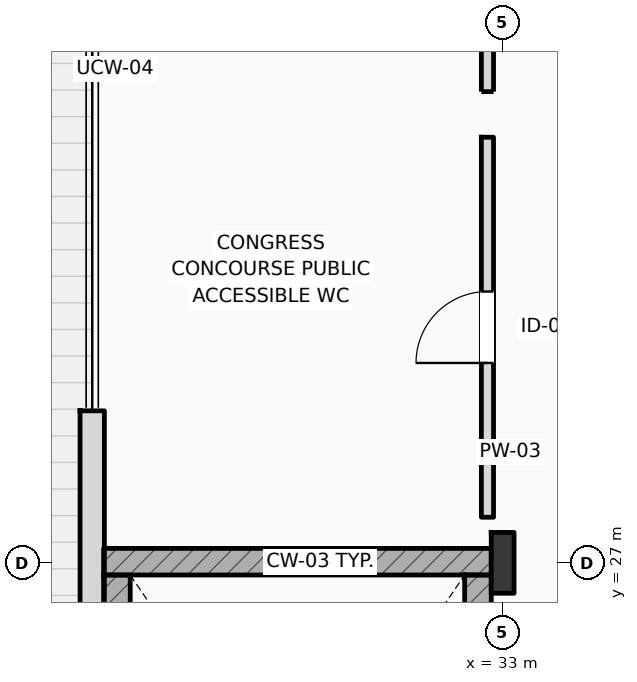
"""IFC4 building model, lengths in metres.
Left out: names, types, materials, properties, quantities, classifications, styles, units other than length and angle.
Written with IfcOpenShell. Run it as: python <this file> out.ifc"""

import sys

from ifc_helpers import new_model, si_unit, direction, frame, frame_2d, origin, origin_2d, place, context, subcontext, project, spatial, rectangle, i_section, extrude, element, fill, save


model = new_model("IFC4")
c1 = context("Model", 3, precision=1e-05, world=origin(), true_north=direction((0.0, 1.0)))
c2 = subcontext(c1, "Body", "Model", "MODEL_VIEW")
j1 = project(units=[si_unit("LENGTHUNIT", "METRE"), si_unit("PLANEANGLEUNIT", "RADIAN")], contexts=[c1])
p1 = place(None, origin())
s1 = spatial("IfcSite", under=j1, at=p1, CompositionType="ELEMENT")
p2 = place(p1, origin())
s2 = spatial("IfcBuilding", under=s1, at=p2, CompositionType="ELEMENT")
p3 = place(p2, origin())
s3 = spatial("IfcBuildingStorey", under=s2, at=p3, CompositionType="ELEMENT", Elevation=0.0)
p4 = place(p3, frame((33.0, 27.0, 0.0), z_axis=(0.0, 0.0, 1.0), x_axis=(1.0, 0.0, 0.0)))
e1 = element("IfcColumn", 1, at=p4, inside=s3, PredefinedType="COLUMN", context=c2, shape_type="SweptSolid", body=[
    extrude(i_section(OverallWidth=0.3, OverallDepth=0.8, WebThickness=0.018, FlangeThickness=0.033, FilletRadius=0.03, at=origin_2d()), origin(), (0.0, 0.0, 1.0), 6.0),
])
p5 = place(p3, frame((27.75, 27.015, 0.0), z_axis=(0.0, 0.0, 1.0), x_axis=(1.0, 0.0, 0.0)))
e2 = element("IfcWall", 2, at=p5, inside=s3, PredefinedType="SHEAR", context=c2, shape_type="SweptSolid", body=[
    extrude(rectangle(XDim=5.1, YDim=0.35, at=frame_2d((2.55, 0.0))), origin(), (0.0, 0.0, 1.0), 6.0),
])
for number, where, z_axis, x_axis in (
    (3, (27.925, 18.16, 0.0), (0.0, 0.0, 1.0), (0.0, 1.0, 0.0)),
    (4, (32.675, 18.16, 0.0), (0.0, 0.0, 1.0), (0.0, 1.0, 0.0)),
):
    element("IfcWall", number, at=place(p3, frame(where, z_axis=z_axis, x_axis=x_axis)), inside=s3, PredefinedType="SHEAR", context=c2, shape_type="SweptSolid", body=[
        extrude(rectangle(XDim=8.68, YDim=0.35, at=frame_2d((4.34, 0.0))), origin(), (0.0, 0.0, 1.0), 6.0),
    ])
p6 = place(p3, frame((27.6, 20.0, 0.0), z_axis=(0.0, 0.0, 1.0), x_axis=(0.0, 1.0, 0.0)))
e5 = element("IfcWall", 5, at=p6, inside=s3, PredefinedType="STANDARD", context=c2, shape_type="SweptSolid", body=[
    extrude(rectangle(XDim=9.0, YDim=0.32, at=frame_2d((4.5, 0.0))), origin(), (0.0, 0.0, 1.0), 5.36),
])
p7 = place(p3, frame((32.8, 27.6, 0.0), z_axis=(0.0, 0.0, 1.0), x_axis=(0.0, 1.0, 0.0)))
e6 = element("IfcWall", 6, at=p7, inside=s3, PredefinedType="PARTITIONING", context=c2, shape_type="SweptSolid", body=[
    extrude(rectangle(XDim=5.0, YDim=0.16, at=frame_2d((2.5, 0.0))), origin(), (0.0, 0.0, 1.0), 5.2),
])
p8 = place(p7, frame((2.03, 0.0, 0.0)))
e7 = element("IfcOpeningElement", 7, at=p8, cuts=e6, PredefinedType="OPENING", context=c2, shape_type="SweptSolid", body=[
    extrude(rectangle(XDim=0.94, YDim=2.15, at=frame_2d((0.47, 1.075))), frame((0.0, 0.09, 0.0), z_axis=(0.0, -1.0, 0.0), x_axis=(1.0, 0.0, 0.0)), (0.0, 0.0, 1.0), 0.18),
])
p9 = place(p3, frame((32.8, 33.2, 0.0), z_axis=(0.0, 0.0, 1.0), x_axis=(0.0, 1.0, 0.0)))
e8 = element("IfcWall", 8, at=p9, inside=s3, PredefinedType="PARTITIONING", context=c2, shape_type="SweptSolid", body=[
    extrude(rectangle(XDim=10.9, YDim=0.16, at=frame_2d((5.45, 0.0))), origin(), (0.0, 0.0, 1.0), 5.2),
])
p10 = place(p9, frame((5.0, 0.0, 0.0)))
e9 = element("IfcOpeningElement", 9, at=p10, cuts=e8, PredefinedType="OPENING", context=c2, shape_type="SweptSolid", body=[
    extrude(rectangle(XDim=0.9, YDim=2.1, at=frame_2d((0.45, 1.05))), frame((0.0, 0.09, 0.0), z_axis=(0.0, -1.0, 0.0), x_axis=(1.0, 0.0, 0.0)), (0.0, 0.0, 1.0), 0.18),
])
p11 = place(p8, origin())
e10 = element("IfcDoor", 10, at=p11, inside=s3, OperationType="SINGLE_SWING_LEFT", PredefinedType="DOOR", context=c2, shape_type="SweptSolid", body=[
    extrude(rectangle(XDim=0.94, YDim=2.15, at=frame_2d((0.47, 1.075))), frame((0.0, 0.025, 0.0), z_axis=(0.0, -1.0, 0.0), x_axis=(1.0, 0.0, 0.0)), (0.0, 0.0, 1.0), 0.05),
])
fill(e7, e10)
save(model, sys.argv[1])
